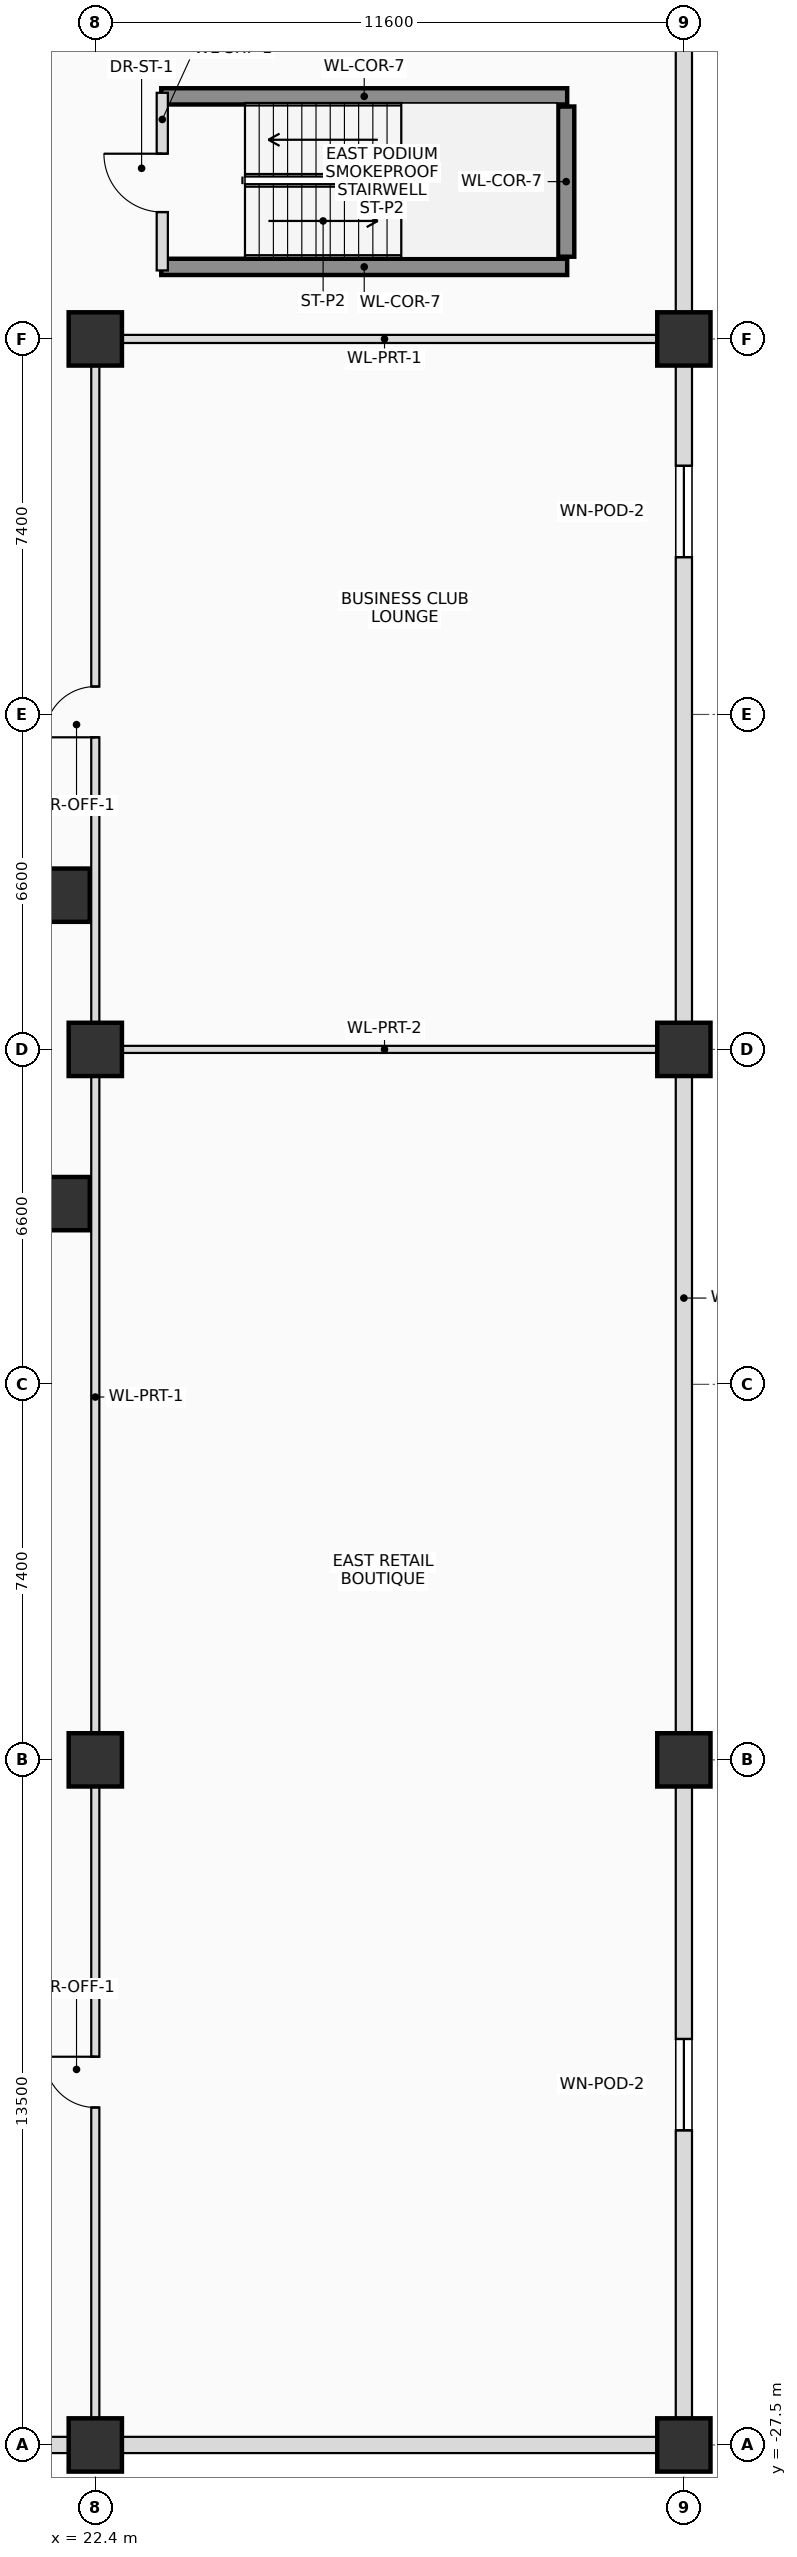
"""IFC4 building model, lengths in metres.
Left out: names, types, materials, properties, quantities, classifications, styles, units other than length and angle.
Written with IfcOpenShell. Run it as: python <this file> out.ifc"""

import sys

from ifc_helpers import new_model, si_unit, direction, frame, frame_2d, origin, origin_2d, place, context, subcontext, project, spatial, rectangle, extrude, source, transform, mapped, element, fill, save


model = new_model("IFC4")
c1 = context("Model", 3, precision=1e-05, world=origin(), true_north=direction((0.0, 1.0)))
c2 = subcontext(c1, "Body", "Model", "MODEL_VIEW")
j1 = project(units=[si_unit("LENGTHUNIT", "METRE"), si_unit("PLANEANGLEUNIT", "RADIAN")], contexts=[c1])
p1 = place(None, origin())
s1 = spatial("IfcSite", under=j1, at=p1, CompositionType="ELEMENT")
p2 = place(p1, origin())
s2 = spatial("IfcBuilding", under=s1, at=p2, CompositionType="ELEMENT")
p3 = place(p2, frame((0.0, 0.0, 4.5)))
s3 = spatial("IfcBuildingStorey", under=s2, at=p3, CompositionType="ELEMENT", Elevation=4.5)
for number, where, z_axis, x_axis in (
    (1, (23.7, 18.78, 0.0), (0.0, 0.0, 1.0), (1.0, 0.0, 0.0)),
    (2, (23.7, 15.42, 0.0), (0.0, 0.0, 1.0), (1.0, 0.0, 0.0)),
):
    element("IfcWall", number, at=place(p3, frame(where, z_axis=z_axis, x_axis=x_axis)), inside=s3, PredefinedType="SHEAR", context=c2, shape_type="SweptSolid", body=[
        extrude(rectangle(XDim=8.0, YDim=0.32, at=frame_2d((4.0, 0.0))), origin(), (0.0, 0.0, 1.0), 3.9),
    ])
p4 = place(p3, frame((31.68, 15.62, 0.0), z_axis=(0.0, 0.0, 1.0), x_axis=(0.0, 1.0, 0.0)))
e3 = element("IfcWall", 3, at=p4, inside=s3, PredefinedType="SHEAR", context=c2, shape_type="SweptSolid", body=[
    extrude(rectangle(XDim=2.96, YDim=0.32, at=frame_2d((1.48, 0.0))), origin(), (0.0, 0.0, 1.0), 3.9),
])
m1 = source(origin(), c2, "Body", "SweptSolid", [
    extrude(rectangle(XDim=1.05, YDim=1.05, at=origin_2d()), origin(), (0.0, 0.0, 1.0), 3.9),
])
for number, where, z_axis, x_axis in (
    (4, (22.4, -27.5, 0.0), (0.0, 0.0, 1.0), (1.0, 0.0, 0.0)),
    (5, (34.0, -27.5, 0.0), (0.0, 0.0, 1.0), (1.0, 0.0, 0.0)),
    (6, (22.4, -14.0, 0.0), (0.0, 0.0, 1.0), (1.0, 0.0, 0.0)),
    (7, (34.0, -14.0, 0.0), (0.0, 0.0, 1.0), (1.0, 0.0, 0.0)),
    (8, (22.4, 0.0, 0.0), (0.0, 0.0, 1.0), (1.0, 0.0, 0.0)),
    (9, (34.0, 0.0, 0.0), (0.0, 0.0, 1.0), (1.0, 0.0, 0.0)),
    (10, (22.4, 14.0, 0.0), (0.0, 0.0, 1.0), (1.0, 0.0, 0.0)),
    (11, (34.0, 14.0, 0.0), (0.0, 0.0, 1.0), (1.0, 0.0, 0.0)),
    (12, (21.766, -3.039, 0.0), (0.0, 0.0, 1.0), (1.0, 0.0, 0.0)),
    (13, (21.766, 3.039, 0.0), (0.0, 0.0, 1.0), (1.0, 0.0, 0.0)),
):
    element("IfcColumn", number, at=place(p3, frame(where, z_axis=z_axis, x_axis=x_axis)), inside=s3, PredefinedType="COLUMN", context=c2, shape_type="MappedRepresentation", body=[
        mapped(m1, transform((0.0, 0.0, 0.0), scale=1.0)),
    ])
p5 = place(p3, frame((34.0, 29.5, 0.0), z_axis=(0.0, 0.0, 1.0), x_axis=(0.0, -1.0, 0.0)))
e14 = element("IfcWall", 14, at=p5, inside=s3, PredefinedType="SOLIDWALL", context=c2, shape_type="SweptSolid", body=[
    extrude(rectangle(XDim=57.0, YDim=0.32, at=frame_2d((28.5, 0.0))), origin(), (0.0, 0.0, 1.0), 2.65),
])
p6 = place(p5, frame((18.0, 0.0, 0.65)))
e15 = element("IfcOpeningElement", 15, at=p6, cuts=e14, PredefinedType="OPENING", context=c2, shape_type="SweptSolid", body=[
    extrude(rectangle(XDim=1.8, YDim=1.8, at=frame_2d((0.9, 0.9))), frame((0.0, 0.17, 0.0), z_axis=(0.0, -1.0, 0.0), x_axis=(1.0, 0.0, 0.0)), (0.0, 0.0, 1.0), 0.34),
])
p7 = place(p5, frame((49.0, 0.0, 0.65)))
e16 = element("IfcOpeningElement", 16, at=p7, cuts=e14, PredefinedType="OPENING", context=c2, shape_type="SweptSolid", body=[
    extrude(rectangle(XDim=1.8, YDim=1.8, at=frame_2d((0.9, 0.9))), frame((0.0, 0.17, 0.0), z_axis=(0.0, -1.0, 0.0), x_axis=(1.0, 0.0, 0.0)), (0.0, 0.0, 1.0), 0.34),
])
p8 = place(p3, frame((34.0, -27.5, 0.0), z_axis=(0.0, 0.0, 1.0), x_axis=(-1.0, 0.0, 0.0)))
e17 = element("IfcWall", 17, at=p8, inside=s3, PredefinedType="SOLIDWALL", context=c2, shape_type="SweptSolid", body=[
    extrude(rectangle(XDim=68.0, YDim=0.32, at=frame_2d((34.0, 0.0))), origin(), (0.0, 0.0, 1.0), 2.65),
])
p9 = place(p8, frame((16.0, 0.0, 0.65)))
e18 = element("IfcOpeningElement", 18, at=p9, cuts=e17, PredefinedType="OPENING", context=c2, shape_type="SweptSolid", body=[
    extrude(rectangle(XDim=1.8, YDim=1.8, at=frame_2d((0.9, 0.9))), frame((0.0, 0.17, 0.0), z_axis=(0.0, -1.0, 0.0), x_axis=(1.0, 0.0, 0.0)), (0.0, 0.0, 1.0), 0.34),
])
p10 = place(p8, frame((49.0, 0.0, 0.65)))
e19 = element("IfcOpeningElement", 19, at=p10, cuts=e17, PredefinedType="OPENING", context=c2, shape_type="SweptSolid", body=[
    extrude(rectangle(XDim=1.8, YDim=1.8, at=frame_2d((0.9, 0.9))), frame((0.0, 0.17, 0.0), z_axis=(0.0, -1.0, 0.0), x_axis=(1.0, 0.0, 0.0)), (0.0, 0.0, 1.0), 0.34),
])
p11 = place(p3, frame((23.72, 15.35, 0.0), z_axis=(0.0, 0.0, 1.0), x_axis=(0.0, 1.0, 0.0)))
e20 = element("IfcWall", 20, at=p11, inside=s3, PredefinedType="PLUMBINGWALL", context=c2, shape_type="SweptSolid", body=[
    extrude(rectangle(XDim=3.5, YDim=0.22, at=frame_2d((1.75, 0.0))), origin(), (0.0, 0.0, 1.0), 3.57),
])
p12 = place(p11, frame((1.15, 0.0, 0.0)))
e21 = element("IfcOpeningElement", 21, at=p12, cuts=e20, PredefinedType="OPENING", context=c2, shape_type="SweptSolid", body=[
    extrude(rectangle(XDim=1.15, YDim=2.15, at=frame_2d((0.575, 1.075))), frame((0.0, 0.12, 0.0), z_axis=(0.0, -1.0, 0.0), x_axis=(1.0, 0.0, 0.0)), (0.0, 0.0, 1.0), 0.24),
])
p13 = place(p3, frame((22.4, -27.35, 0.0), z_axis=(0.0, 0.0, 1.0), x_axis=(0.0, 1.0, 0.0)))
e22 = element("IfcWall", 22, at=p13, inside=s3, PredefinedType="PARTITIONING", context=c2, shape_type="SweptSolid", body=[
    extrude(rectangle(XDim=41.35, YDim=0.16, at=frame_2d((20.675, 0.0))), origin(), (0.0, 0.0, 1.0), 2.775),
])
p14 = place(p13, frame((6.5, 0.0, 0.0)))
e23 = element("IfcOpeningElement", 23, at=p14, cuts=e22, PredefinedType="OPENING", context=c2, shape_type="SweptSolid", body=[
    extrude(rectangle(XDim=1.0, YDim=2.25, at=frame_2d((0.5, 1.125))), frame((0.0, 0.09, 0.0), z_axis=(0.0, -1.0, 0.0), x_axis=(1.0, 0.0, 0.0)), (0.0, 0.0, 1.0), 0.18),
])
p15 = place(p13, frame((33.5, 0.0, 0.0)))
e24 = element("IfcOpeningElement", 24, at=p15, cuts=e22, PredefinedType="OPENING", context=c2, shape_type="SweptSolid", body=[
    extrude(rectangle(XDim=1.0, YDim=2.25, at=frame_2d((0.5, 1.125))), frame((0.0, 0.09, 0.0), z_axis=(0.0, -1.0, 0.0), x_axis=(1.0, 0.0, 0.0)), (0.0, 0.0, 1.0), 0.18),
])
p16 = place(p3, frame((22.4, 14.0, 0.0), z_axis=(0.0, 0.0, 1.0), x_axis=(1.0, 0.0, 0.0)))
e25 = element("IfcWall", 25, at=p16, inside=s3, PredefinedType="PARTITIONING", context=c2, shape_type="SweptSolid", body=[
    extrude(rectangle(XDim=11.4, YDim=0.16, at=frame_2d((5.7, 0.0))), origin(), (0.0, 0.0, 1.0), 2.775),
])
p17 = place(p3, frame((22.4, 0.0, 0.0), z_axis=(0.0, 0.0, 1.0), x_axis=(1.0, 0.0, 0.0)))
e26 = element("IfcWall", 26, at=p17, inside=s3, PredefinedType="PARTITIONING", context=c2, shape_type="SweptSolid", body=[
    extrude(rectangle(XDim=11.4, YDim=0.14, at=frame_2d((5.7, 0.0))), origin(), (0.0, 0.0, 1.0), 2.775),
])
p18 = place(p6, origin())
e27 = element("IfcWindow", 27, at=p18, inside=s3, PartitioningType="SINGLE_PANEL", PredefinedType="WINDOW", context=c2, shape_type="SweptSolid", body=[
    extrude(rectangle(XDim=1.8, YDim=1.8, at=frame_2d((0.9, 0.9))), frame((0.0, 0.03, 0.0), z_axis=(0.0, -1.0, 0.0), x_axis=(1.0, 0.0, 0.0)), (0.0, 0.0, 1.0), 0.06),
])
fill(e15, e27)
p19 = place(p7, origin())
e28 = element("IfcWindow", 28, at=p19, inside=s3, PartitioningType="SINGLE_PANEL", PredefinedType="WINDOW", context=c2, shape_type="SweptSolid", body=[
    extrude(rectangle(XDim=1.8, YDim=1.8, at=frame_2d((0.9, 0.9))), frame((0.0, 0.03, 0.0), z_axis=(0.0, -1.0, 0.0), x_axis=(1.0, 0.0, 0.0)), (0.0, 0.0, 1.0), 0.06),
])
fill(e16, e28)
p20 = place(p12, origin())
e29 = element("IfcDoor", 29, at=p20, inside=s3, OperationType="SINGLE_SWING_RIGHT", PredefinedType="DOOR", context=c2, shape_type="SweptSolid", body=[
    extrude(rectangle(XDim=1.15, YDim=2.15, at=frame_2d((0.575, 1.075))), frame((0.0, 0.025, 0.0), z_axis=(0.0, -1.0, 0.0), x_axis=(1.0, 0.0, 0.0)), (0.0, 0.0, 1.0), 0.05),
])
fill(e21, e29)
p21 = place(p14, origin())
e30 = element("IfcDoor", 30, at=p21, inside=s3, OperationType="SINGLE_SWING_RIGHT", PredefinedType="DOOR", context=c2, shape_type="SweptSolid", body=[
    extrude(rectangle(XDim=1.0, YDim=2.25, at=frame_2d((0.5, 1.125))), frame((0.0, 0.025, 0.0), z_axis=(0.0, -1.0, 0.0), x_axis=(1.0, 0.0, 0.0)), (0.0, 0.0, 1.0), 0.05),
])
fill(e23, e30)
p22 = place(p15, origin())
e31 = element("IfcDoor", 31, at=p22, inside=s3, OperationType="SINGLE_SWING_LEFT", PredefinedType="DOOR", context=c2, shape_type="SweptSolid", body=[
    extrude(rectangle(XDim=1.0, YDim=2.25, at=frame_2d((0.5, 1.125))), frame((0.0, 0.025, 0.0), z_axis=(0.0, -1.0, 0.0), x_axis=(1.0, 0.0, 0.0)), (0.0, 0.0, 1.0), 0.05),
])
fill(e24, e31)
save(model, sys.argv[1])
